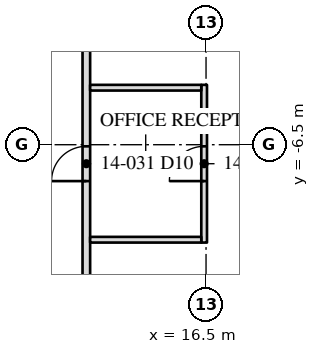
"""IFC4 building model, lengths in metres.
Left out: names, types, materials, properties, quantities, classifications, styles, units other than length and angle.
Written with IfcOpenShell. Run it as: python <this file> out.ifc"""

import sys

from ifc_helpers import new_model, si_unit, direction, frame, frame_2d, origin, place, context, subcontext, project, spatial, rectangle, extrude, element, fill, save


model = new_model("IFC4")
c1 = context("Model", 3, precision=1e-05, world=origin(), true_north=direction((0.0, 1.0)))
c2 = subcontext(c1, "Body", "Model", "MODEL_VIEW")
j1 = project(units=[si_unit("LENGTHUNIT", "METRE"), si_unit("PLANEANGLEUNIT", "RADIAN")], contexts=[c1])
p1 = place(None, origin())
s1 = spatial("IfcSite", under=j1, at=p1, CompositionType="ELEMENT")
p2 = place(p1, origin())
s2 = spatial("IfcBuilding", under=s1, at=p2, CompositionType="ELEMENT")
p3 = place(p2, frame((0.0, 0.0, 61.1)))
s3 = spatial("IfcBuildingStorey", under=s2, at=p3, CompositionType="ELEMENT", Elevation=61.1)
p4 = place(p3, frame((13.35, -13.45, 0.0), z_axis=(0.0, 0.0, 1.0), x_axis=(0.0, 1.0, 0.0)))
e1 = element("IfcWall", 1, at=p4, inside=s3, PredefinedType="PARTITIONING", context=c2, shape_type="SweptSolid", body=[
    extrude(rectangle(XDim=26.7, YDim=0.2, at=frame_2d((13.35, 0.0))), origin(), (0.0, 0.0, 1.0), 3.91),
])
p5 = place(p4, frame((5.992, 0.0, 0.0)))
e2 = element("IfcOpeningElement", 2, at=p5, cuts=e1, PredefinedType="OPENING", context=c2, shape_type="SweptSolid", body=[
    extrude(rectangle(XDim=0.915, YDim=2.134, at=frame_2d((0.458, 1.067))), frame((0.0, 0.11, 0.0), z_axis=(0.0, -1.0, 0.0), x_axis=(1.0, 0.0, 0.0)), (0.0, 0.0, 1.0), 0.22),
])
p6 = place(p3, frame((16.45, -9.075, 0.0), z_axis=(0.0, 0.0, 1.0), x_axis=(0.0, 1.0, 0.0)))
e3 = element("IfcWall", 3, at=p6, inside=s3, PredefinedType="PARTITIONING", context=c2, shape_type="SweptSolid", body=[
    extrude(rectangle(XDim=4.15, YDim=0.15, at=frame_2d((2.075, 0.0))), origin(), (0.0, 0.0, 1.0), 3.91),
])
p7 = place(p6, frame((1.617, 0.0, 0.0)))
e4 = element("IfcOpeningElement", 4, at=p7, cuts=e3, PredefinedType="OPENING", context=c2, shape_type="SweptSolid", body=[
    extrude(rectangle(XDim=0.915, YDim=2.134, at=frame_2d((0.458, 1.067))), frame((0.0, 0.085, 0.0), z_axis=(0.0, -1.0, 0.0), x_axis=(1.0, 0.0, 0.0)), (0.0, 0.0, 1.0), 0.17),
])
for number, where, z_axis, x_axis in (
    (5, (16.375, -9.0, 0.0), (0.0, 0.0, 1.0), (-1.0, 0.0, 0.0)),
    (6, (16.375, -5.0, 0.0), (0.0, 0.0, 1.0), (-1.0, 0.0, 0.0)),
):
    element("IfcWall", number, at=place(p3, frame(where, z_axis=z_axis, x_axis=x_axis)), inside=s3, PredefinedType="PARTITIONING", context=c2, shape_type="SweptSolid", body=[
        extrude(rectangle(XDim=2.925, YDim=0.15, at=frame_2d((1.462, 0.0))), origin(), (0.0, 0.0, 1.0), 3.91),
    ])
p8 = place(p7, origin())
e7 = element("IfcDoor", 7, at=p8, inside=s3, OperationType="SINGLE_SWING_LEFT", PredefinedType="DOOR", context=c2, shape_type="SweptSolid", body=[
    extrude(rectangle(XDim=0.915, YDim=2.134, at=frame_2d((0.458, 1.067))), frame((0.0, 0.025, 0.0), z_axis=(0.0, -1.0, 0.0), x_axis=(1.0, 0.0, 0.0)), (0.0, 0.0, 1.0), 0.05),
])
fill(e4, e7)
p9 = place(p5, origin())
e8 = element("IfcDoor", 8, at=p9, inside=s3, OperationType="SINGLE_SWING_LEFT", PredefinedType="DOOR", context=c2, shape_type="SweptSolid", body=[
    extrude(rectangle(XDim=0.915, YDim=2.134, at=frame_2d((0.458, 1.067))), frame((0.0, 0.025, 0.0), z_axis=(0.0, -1.0, 0.0), x_axis=(1.0, 0.0, 0.0)), (0.0, 0.0, 1.0), 0.05),
])
fill(e2, e8)
save(model, sys.argv[1])
